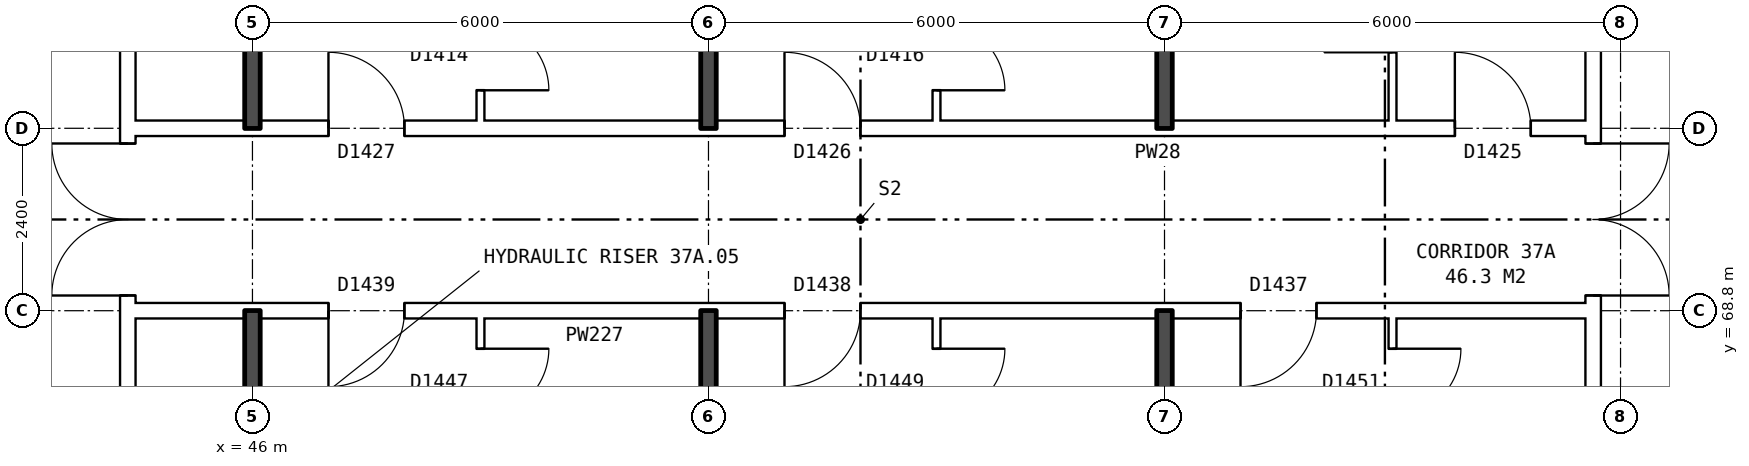
"""IFC4 building model, lengths in metres.
Left out: names, types, materials, properties, quantities, classifications, styles, units other than length and angle.
Written with IfcOpenShell. Run it as: python <this file> out.ifc"""

import sys

from ifc_helpers import new_model, si_unit, direction, frame, frame_2d, origin, place, context, subcontext, project, spatial, rectangle, extrude, element, fill, save


model = new_model("IFC4")
c1 = context("Model", 3, precision=1e-05, world=origin(), true_north=direction((0.0, 1.0)))
c2 = subcontext(c1, "Body", "Model", "MODEL_VIEW")
j1 = project(units=[si_unit("LENGTHUNIT", "METRE"), si_unit("PLANEANGLEUNIT", "RADIAN")], contexts=[c1])
p1 = place(None, origin())
s1 = spatial("IfcSite", under=j1, at=p1, CompositionType="ELEMENT")
p2 = place(p1, origin())
s2 = spatial("IfcBuilding", under=s1, at=p2, CompositionType="ELEMENT")
p3 = place(p2, frame((0.0, 0.0, 133.0)))
s3 = spatial("IfcBuildingStorey", under=s2, at=p3, CompositionType="ELEMENT", Elevation=133.0)
p4 = place(p3, frame((63.64, 63.9, 0.0), z_axis=(0.0, 0.0, 1.0), x_axis=(0.0, 1.0, 0.0)))
e1 = element("IfcWall", 1, at=p4, inside=s3, PredefinedType="PARTITIONING", context=c2, shape_type="SweptSolid", body=[
    extrude(rectangle(XDim=12.2, YDim=0.2, at=frame_2d((6.1, 0.0))), origin(), (0.0, 0.0, 1.0), 2.85),
])
p5 = place(p4, frame((5.1, 0.0, 0.0)))
e2 = element("IfcOpeningElement", 2, at=p5, cuts=e1, PredefinedType="OPENING", context=c2, shape_type="SweptSolid", body=[
    extrude(rectangle(XDim=2.0, YDim=2.1, at=frame_2d((1.0, 1.05))), frame((0.0, 0.11, 0.0), z_axis=(0.0, -1.0, 0.0), x_axis=(1.0, 0.0, 0.0)), (0.0, 0.0, 1.0), 0.22),
])
p6 = place(p3, frame((44.36, 63.9, 0.0), z_axis=(0.0, 0.0, 1.0), x_axis=(0.0, 1.0, 0.0)))
e3 = element("IfcWall", 3, at=p6, inside=s3, PredefinedType="PARTITIONING", context=c2, shape_type="SweptSolid", body=[
    extrude(rectangle(XDim=12.2, YDim=0.2, at=frame_2d((6.1, 0.0))), origin(), (0.0, 0.0, 1.0), 2.85),
])
p7 = place(p6, frame((5.1, 0.0, 0.0)))
e4 = element("IfcOpeningElement", 4, at=p7, cuts=e3, PredefinedType="OPENING", context=c2, shape_type="SweptSolid", body=[
    extrude(rectangle(XDim=2.0, YDim=2.1, at=frame_2d((1.0, 1.05))), frame((0.0, 0.11, 0.0), z_axis=(0.0, -1.0, 0.0), x_axis=(1.0, 0.0, 0.0)), (0.0, 0.0, 1.0), 0.22),
])
p8 = place(p3, frame((44.36, 68.8, 0.0), z_axis=(0.0, 0.0, 1.0), x_axis=(1.0, 0.0, 0.0)))
e5 = element("IfcWall", 5, at=p8, inside=s3, PredefinedType="PARTITIONING", context=c2, shape_type="SweptSolid", body=[
    extrude(rectangle(XDim=19.28, YDim=0.2, at=frame_2d((9.64, 0.0))), origin(), (0.0, 0.0, 1.0), 2.85),
])
p9 = place(p8, frame((14.64, 0.0, 0.0)))
e6 = element("IfcOpeningElement", 6, at=p9, cuts=e5, PredefinedType="OPENING", context=c2, shape_type="SweptSolid", body=[
    extrude(rectangle(XDim=1.0, YDim=2.1, at=frame_2d((0.5, 1.05))), frame((0.0, 0.11, 0.0), z_axis=(0.0, -1.0, 0.0), x_axis=(1.0, 0.0, 0.0)), (0.0, 0.0, 1.0), 0.22),
])
p10 = place(p8, frame((8.64, 0.0, 0.0)))
e7 = element("IfcOpeningElement", 7, at=p10, cuts=e5, PredefinedType="OPENING", context=c2, shape_type="SweptSolid", body=[
    extrude(rectangle(XDim=1.0, YDim=2.1, at=frame_2d((0.5, 1.05))), frame((0.0, 0.11, 0.0), z_axis=(0.0, -1.0, 0.0), x_axis=(1.0, 0.0, 0.0)), (0.0, 0.0, 1.0), 0.22),
])
p11 = place(p8, frame((2.64, 0.0, 0.0)))
e8 = element("IfcOpeningElement", 8, at=p11, cuts=e5, PredefinedType="OPENING", context=c2, shape_type="SweptSolid", body=[
    extrude(rectangle(XDim=1.0, YDim=2.1, at=frame_2d((0.5, 1.05))), frame((0.0, 0.11, 0.0), z_axis=(0.0, -1.0, 0.0), x_axis=(1.0, 0.0, 0.0)), (0.0, 0.0, 1.0), 0.22),
])
p12 = place(p3, frame((44.36, 71.2, 0.0), z_axis=(0.0, 0.0, 1.0), x_axis=(1.0, 0.0, 0.0)))
e9 = element("IfcWall", 9, at=p12, inside=s3, PredefinedType="PARTITIONING", context=c2, shape_type="SweptSolid", body=[
    extrude(rectangle(XDim=19.28, YDim=0.2, at=frame_2d((9.64, 0.0))), origin(), (0.0, 0.0, 1.0), 2.85),
])
p13 = place(p12, frame((17.46, 0.0, 0.0)))
e10 = element("IfcOpeningElement", 10, at=p13, cuts=e9, PredefinedType="OPENING", context=c2, shape_type="SweptSolid", body=[
    extrude(rectangle(XDim=1.0, YDim=2.1, at=frame_2d((0.5, 1.05))), frame((0.0, 0.11, 0.0), z_axis=(0.0, -1.0, 0.0), x_axis=(1.0, 0.0, 0.0)), (0.0, 0.0, 1.0), 0.22),
])
p14 = place(p12, frame((8.64, 0.0, 0.0)))
e11 = element("IfcOpeningElement", 11, at=p14, cuts=e9, PredefinedType="OPENING", context=c2, shape_type="SweptSolid", body=[
    extrude(rectangle(XDim=1.0, YDim=2.1, at=frame_2d((0.5, 1.05))), frame((0.0, 0.11, 0.0), z_axis=(0.0, -1.0, 0.0), x_axis=(1.0, 0.0, 0.0)), (0.0, 0.0, 1.0), 0.22),
])
p15 = place(p12, frame((2.64, 0.0, 0.0)))
e12 = element("IfcOpeningElement", 12, at=p15, cuts=e9, PredefinedType="OPENING", context=c2, shape_type="SweptSolid", body=[
    extrude(rectangle(XDim=1.0, YDim=2.1, at=frame_2d((0.5, 1.05))), frame((0.0, 0.11, 0.0), z_axis=(0.0, -1.0, 0.0), x_axis=(1.0, 0.0, 0.0)), (0.0, 0.0, 1.0), 0.22),
])
for number, where, z_axis, x_axis in (
    (13, (46.0, 63.8, 0.0), (0.0, 0.0, 1.0), (0.0, 1.0, 0.0)),
    (14, (46.0, 71.2, 0.0), (0.0, 0.0, 1.0), (0.0, 1.0, 0.0)),
):
    element("IfcWall", number, at=place(p3, frame(where, z_axis=z_axis, x_axis=x_axis)), inside=s3, PredefinedType="SOLIDWALL", context=c2, shape_type="SweptSolid", body=[
        extrude(rectangle(XDim=5.0, YDim=0.2, at=frame_2d((2.5, 0.0))), origin(), (0.0, 0.0, 1.0), 2.85),
    ])
p16 = place(p3, frame((49.0, 54.36, 0.0), z_axis=(0.0, 0.0, 1.0), x_axis=(0.0, 1.0, 0.0)))
e15 = element("IfcWall", 15, at=p16, inside=s3, PredefinedType="PARTITIONING", context=c2, shape_type="SweptSolid", body=[
    extrude(rectangle(XDim=14.34, YDim=0.1, at=frame_2d((7.17, 0.0))), origin(), (0.0, 0.0, 1.0), 2.85),
])
p17 = place(p16, frame((6.7, 0.0, 0.0)))
e16 = element("IfcOpeningElement", 16, at=p17, cuts=e15, PredefinedType="OPENING", context=c2, shape_type="SweptSolid", body=[
    extrude(rectangle(XDim=0.9, YDim=2.1, at=frame_2d((0.45, 1.05))), frame((0.0, 0.06, 0.0), z_axis=(0.0, -1.0, 0.0), x_axis=(1.0, 0.0, 0.0)), (0.0, 0.0, 1.0), 0.12),
])
p18 = place(p16, frame((13.04, 0.0, 0.0)))
e17 = element("IfcOpeningElement", 17, at=p18, cuts=e15, PredefinedType="OPENING", context=c2, shape_type="SweptSolid", body=[
    extrude(rectangle(XDim=0.9, YDim=2.1, at=frame_2d((0.45, 1.05))), frame((0.0, 0.06, 0.0), z_axis=(0.0, -1.0, 0.0), x_axis=(1.0, 0.0, 0.0)), (0.0, 0.0, 1.0), 0.12),
])
p19 = place(p3, frame((49.0, 71.3, 0.0), z_axis=(0.0, 0.0, 1.0), x_axis=(0.0, 1.0, 0.0)))
e18 = element("IfcWall", 18, at=p19, inside=s3, PredefinedType="PARTITIONING", context=c2, shape_type="SweptSolid", body=[
    extrude(rectangle(XDim=14.34, YDim=0.1, at=frame_2d((7.17, 0.0))), origin(), (0.0, 0.0, 1.0), 2.85),
])
p20 = place(p19, frame((7.94, 0.0, 0.0)))
e19 = element("IfcOpeningElement", 19, at=p20, cuts=e18, PredefinedType="OPENING", context=c2, shape_type="SweptSolid", body=[
    extrude(rectangle(XDim=0.9, YDim=2.1, at=frame_2d((0.45, 1.05))), frame((0.0, 0.06, 0.0), z_axis=(0.0, -1.0, 0.0), x_axis=(1.0, 0.0, 0.0)), (0.0, 0.0, 1.0), 0.12),
])
p21 = place(p19, frame((0.4, 0.0, 0.0)))
e20 = element("IfcOpeningElement", 20, at=p21, cuts=e18, PredefinedType="OPENING", context=c2, shape_type="SweptSolid", body=[
    extrude(rectangle(XDim=0.9, YDim=2.1, at=frame_2d((0.45, 1.05))), frame((0.0, 0.06, 0.0), z_axis=(0.0, -1.0, 0.0), x_axis=(1.0, 0.0, 0.0)), (0.0, 0.0, 1.0), 0.12),
])
for number, where, z_axis, x_axis in (
    (21, (52.0, 54.36, 0.0), (0.0, 0.0, 1.0), (0.0, 1.0, 0.0)),
    (22, (52.0, 71.2, 0.0), (0.0, 0.0, 1.0), (0.0, 1.0, 0.0)),
):
    element("IfcWall", number, at=place(p3, frame(where, z_axis=z_axis, x_axis=x_axis)), inside=s3, PredefinedType="SOLIDWALL", context=c2, shape_type="SweptSolid", body=[
        extrude(rectangle(XDim=14.44, YDim=0.2, at=frame_2d((7.22, 0.0))), origin(), (0.0, 0.0, 1.0), 2.85),
    ])
p22 = place(p3, frame((55.0, 54.36, 0.0), z_axis=(0.0, 0.0, 1.0), x_axis=(0.0, 1.0, 0.0)))
e23 = element("IfcWall", 23, at=p22, inside=s3, PredefinedType="PARTITIONING", context=c2, shape_type="SweptSolid", body=[
    extrude(rectangle(XDim=14.34, YDim=0.1, at=frame_2d((7.17, 0.0))), origin(), (0.0, 0.0, 1.0), 2.85),
])
p23 = place(p22, frame((6.7, 0.0, 0.0)))
e24 = element("IfcOpeningElement", 24, at=p23, cuts=e23, PredefinedType="OPENING", context=c2, shape_type="SweptSolid", body=[
    extrude(rectangle(XDim=0.9, YDim=2.1, at=frame_2d((0.45, 1.05))), frame((0.0, 0.06, 0.0), z_axis=(0.0, -1.0, 0.0), x_axis=(1.0, 0.0, 0.0)), (0.0, 0.0, 1.0), 0.12),
])
p24 = place(p22, frame((13.04, 0.0, 0.0)))
e25 = element("IfcOpeningElement", 25, at=p24, cuts=e23, PredefinedType="OPENING", context=c2, shape_type="SweptSolid", body=[
    extrude(rectangle(XDim=0.9, YDim=2.1, at=frame_2d((0.45, 1.05))), frame((0.0, 0.06, 0.0), z_axis=(0.0, -1.0, 0.0), x_axis=(1.0, 0.0, 0.0)), (0.0, 0.0, 1.0), 0.12),
])
p25 = place(p3, frame((55.0, 71.3, 0.0), z_axis=(0.0, 0.0, 1.0), x_axis=(0.0, 1.0, 0.0)))
e26 = element("IfcWall", 26, at=p25, inside=s3, PredefinedType="PARTITIONING", context=c2, shape_type="SweptSolid", body=[
    extrude(rectangle(XDim=14.34, YDim=0.1, at=frame_2d((7.17, 0.0))), origin(), (0.0, 0.0, 1.0), 2.85),
])
p26 = place(p25, frame((6.74, 0.0, 0.0)))
e27 = element("IfcOpeningElement", 27, at=p26, cuts=e26, PredefinedType="OPENING", context=c2, shape_type="SweptSolid", body=[
    extrude(rectangle(XDim=0.9, YDim=2.1, at=frame_2d((0.45, 1.05))), frame((0.0, 0.06, 0.0), z_axis=(0.0, -1.0, 0.0), x_axis=(1.0, 0.0, 0.0)), (0.0, 0.0, 1.0), 0.12),
])
p27 = place(p25, frame((0.4, 0.0, 0.0)))
e28 = element("IfcOpeningElement", 28, at=p27, cuts=e26, PredefinedType="OPENING", context=c2, shape_type="SweptSolid", body=[
    extrude(rectangle(XDim=0.9, YDim=2.1, at=frame_2d((0.45, 1.05))), frame((0.0, 0.06, 0.0), z_axis=(0.0, -1.0, 0.0), x_axis=(1.0, 0.0, 0.0)), (0.0, 0.0, 1.0), 0.12),
])
for number, where, z_axis, x_axis in (
    (29, (58.0, 54.36, 0.0), (0.0, 0.0, 1.0), (0.0, 1.0, 0.0)),
    (30, (58.0, 71.2, 0.0), (0.0, 0.0, 1.0), (0.0, 1.0, 0.0)),
):
    element("IfcWall", number, at=place(p3, frame(where, z_axis=z_axis, x_axis=x_axis)), inside=s3, PredefinedType="SOLIDWALL", context=c2, shape_type="SweptSolid", body=[
        extrude(rectangle(XDim=14.44, YDim=0.2, at=frame_2d((7.22, 0.0))), origin(), (0.0, 0.0, 1.0), 2.85),
    ])
p28 = place(p3, frame((61.0, 54.36, 0.0), z_axis=(0.0, 0.0, 1.0), x_axis=(0.0, 1.0, 0.0)))
e31 = element("IfcWall", 31, at=p28, inside=s3, PredefinedType="PARTITIONING", context=c2, shape_type="SweptSolid", body=[
    extrude(rectangle(XDim=14.34, YDim=0.1, at=frame_2d((7.17, 0.0))), origin(), (0.0, 0.0, 1.0), 2.85),
])
p29 = place(p28, frame((4.2, 0.0, 0.0)))
e32 = element("IfcOpeningElement", 32, at=p29, cuts=e31, PredefinedType="OPENING", context=c2, shape_type="SweptSolid", body=[
    extrude(rectangle(XDim=0.9, YDim=2.1, at=frame_2d((0.45, 1.05))), frame((0.0, 0.06, 0.0), z_axis=(0.0, -1.0, 0.0), x_axis=(1.0, 0.0, 0.0)), (0.0, 0.0, 1.0), 0.12),
])
p30 = place(p28, frame((13.04, 0.0, 0.0)))
e33 = element("IfcOpeningElement", 33, at=p30, cuts=e31, PredefinedType="OPENING", context=c2, shape_type="SweptSolid", body=[
    extrude(rectangle(XDim=0.9, YDim=2.1, at=frame_2d((0.45, 1.05))), frame((0.0, 0.06, 0.0), z_axis=(0.0, -1.0, 0.0), x_axis=(1.0, 0.0, 0.0)), (0.0, 0.0, 1.0), 0.12),
])
p31 = place(p3, frame((61.0, 71.3, 0.0), z_axis=(0.0, 0.0, 1.0), x_axis=(0.0, 1.0, 0.0)))
e34 = element("IfcWall", 34, at=p31, inside=s3, PredefinedType="PARTITIONING", context=c2, shape_type="SweptSolid", body=[
    extrude(rectangle(XDim=14.34, YDim=0.1, at=frame_2d((7.17, 0.0))), origin(), (0.0, 0.0, 1.0), 2.85),
])
p32 = place(p31, frame((7.94, 0.0, 0.0)))
e35 = element("IfcOpeningElement", 35, at=p32, cuts=e34, PredefinedType="OPENING", context=c2, shape_type="SweptSolid", body=[
    extrude(rectangle(XDim=0.9, YDim=2.1, at=frame_2d((0.45, 1.05))), frame((0.0, 0.06, 0.0), z_axis=(0.0, -1.0, 0.0), x_axis=(1.0, 0.0, 0.0)), (0.0, 0.0, 1.0), 0.12),
])
p33 = place(p31, frame((0.9, 0.0, 0.0)))
e36 = element("IfcOpeningElement", 36, at=p33, cuts=e34, PredefinedType="OPENING", context=c2, shape_type="SweptSolid", body=[
    extrude(rectangle(XDim=0.9, YDim=2.1, at=frame_2d((0.45, 1.05))), frame((0.0, 0.06, 0.0), z_axis=(0.0, -1.0, 0.0), x_axis=(1.0, 0.0, 0.0)), (0.0, 0.0, 1.0), 0.12),
])
p34 = place(p5, frame((2.0, 0.0, 0.0), z_axis=(0.0, 0.0, 1.0), x_axis=(-1.0, 0.0, 0.0)))
e37 = element("IfcDoor", 37, at=p34, inside=s3, OperationType="DOUBLE_DOOR_SINGLE_SWING", PredefinedType="DOOR", context=c2, shape_type="SweptSolid", body=[
    extrude(rectangle(XDim=2.0, YDim=2.1, at=frame_2d((1.0, 1.05))), frame((0.0, 0.025, 0.0), z_axis=(0.0, -1.0, 0.0), x_axis=(1.0, 0.0, 0.0)), (0.0, 0.0, 1.0), 0.05),
])
fill(e2, e37)
p35 = place(p7, origin())
e38 = element("IfcDoor", 38, at=p35, inside=s3, OperationType="DOUBLE_DOOR_SINGLE_SWING", PredefinedType="DOOR", context=c2, shape_type="SweptSolid", body=[
    extrude(rectangle(XDim=2.0, YDim=2.1, at=frame_2d((1.0, 1.05))), frame((0.0, 0.025, 0.0), z_axis=(0.0, -1.0, 0.0), x_axis=(1.0, 0.0, 0.0)), (0.0, 0.0, 1.0), 0.05),
])
fill(e4, e38)
p36 = place(p9, frame((1.0, 0.0, 0.0), z_axis=(0.0, 0.0, 1.0), x_axis=(-1.0, 0.0, 0.0)))
e39 = element("IfcDoor", 39, at=p36, inside=s3, OperationType="SINGLE_SWING_RIGHT", PredefinedType="DOOR", context=c2, shape_type="SweptSolid", body=[
    extrude(rectangle(XDim=1.0, YDim=2.1, at=frame_2d((0.5, 1.05))), frame((0.0, 0.025, 0.0), z_axis=(0.0, -1.0, 0.0), x_axis=(1.0, 0.0, 0.0)), (0.0, 0.0, 1.0), 0.05),
])
fill(e6, e39)
p37 = place(p30, frame((0.9, 0.0, 0.0), z_axis=(0.0, 0.0, 1.0), x_axis=(-1.0, 0.0, 0.0)))
e40 = element("IfcDoor", 40, at=p37, inside=s3, OperationType="SINGLE_SWING_LEFT", PredefinedType="DOOR", context=c2, shape_type="SweptSolid", body=[
    extrude(rectangle(XDim=0.9, YDim=2.1, at=frame_2d((0.45, 1.05))), frame((0.0, 0.025, 0.0), z_axis=(0.0, -1.0, 0.0), x_axis=(1.0, 0.0, 0.0)), (0.0, 0.0, 1.0), 0.05),
])
fill(e33, e40)
p38 = place(p10, frame((1.0, 0.0, 0.0), z_axis=(0.0, 0.0, 1.0), x_axis=(-1.0, 0.0, 0.0)))
e41 = element("IfcDoor", 41, at=p38, inside=s3, OperationType="SINGLE_SWING_RIGHT", PredefinedType="DOOR", context=c2, shape_type="SweptSolid", body=[
    extrude(rectangle(XDim=1.0, YDim=2.1, at=frame_2d((0.5, 1.05))), frame((0.0, 0.025, 0.0), z_axis=(0.0, -1.0, 0.0), x_axis=(1.0, 0.0, 0.0)), (0.0, 0.0, 1.0), 0.05),
])
fill(e7, e41)
p39 = place(p24, frame((0.9, 0.0, 0.0), z_axis=(0.0, 0.0, 1.0), x_axis=(-1.0, 0.0, 0.0)))
e42 = element("IfcDoor", 42, at=p39, inside=s3, OperationType="SINGLE_SWING_LEFT", PredefinedType="DOOR", context=c2, shape_type="SweptSolid", body=[
    extrude(rectangle(XDim=0.9, YDim=2.1, at=frame_2d((0.45, 1.05))), frame((0.0, 0.025, 0.0), z_axis=(0.0, -1.0, 0.0), x_axis=(1.0, 0.0, 0.0)), (0.0, 0.0, 1.0), 0.05),
])
fill(e25, e42)
p40 = place(p11, frame((1.0, 0.0, 0.0), z_axis=(0.0, 0.0, 1.0), x_axis=(-1.0, 0.0, 0.0)))
e43 = element("IfcDoor", 43, at=p40, inside=s3, OperationType="SINGLE_SWING_RIGHT", PredefinedType="DOOR", context=c2, shape_type="SweptSolid", body=[
    extrude(rectangle(XDim=1.0, YDim=2.1, at=frame_2d((0.5, 1.05))), frame((0.0, 0.025, 0.0), z_axis=(0.0, -1.0, 0.0), x_axis=(1.0, 0.0, 0.0)), (0.0, 0.0, 1.0), 0.05),
])
fill(e8, e43)
p41 = place(p18, frame((0.9, 0.0, 0.0), z_axis=(0.0, 0.0, 1.0), x_axis=(-1.0, 0.0, 0.0)))
e44 = element("IfcDoor", 44, at=p41, inside=s3, OperationType="SINGLE_SWING_LEFT", PredefinedType="DOOR", context=c2, shape_type="SweptSolid", body=[
    extrude(rectangle(XDim=0.9, YDim=2.1, at=frame_2d((0.45, 1.05))), frame((0.0, 0.025, 0.0), z_axis=(0.0, -1.0, 0.0), x_axis=(1.0, 0.0, 0.0)), (0.0, 0.0, 1.0), 0.05),
])
fill(e17, e44)
p42 = place(p13, origin())
e45 = element("IfcDoor", 45, at=p42, inside=s3, OperationType="SINGLE_SWING_LEFT", PredefinedType="DOOR", context=c2, shape_type="SweptSolid", body=[
    extrude(rectangle(XDim=1.0, YDim=2.1, at=frame_2d((0.5, 1.05))), frame((0.0, 0.025, 0.0), z_axis=(0.0, -1.0, 0.0), x_axis=(1.0, 0.0, 0.0)), (0.0, 0.0, 1.0), 0.05),
])
fill(e10, e45)
p43 = place(p14, origin())
e46 = element("IfcDoor", 46, at=p43, inside=s3, OperationType="SINGLE_SWING_LEFT", PredefinedType="DOOR", context=c2, shape_type="SweptSolid", body=[
    extrude(rectangle(XDim=1.0, YDim=2.1, at=frame_2d((0.5, 1.05))), frame((0.0, 0.025, 0.0), z_axis=(0.0, -1.0, 0.0), x_axis=(1.0, 0.0, 0.0)), (0.0, 0.0, 1.0), 0.05),
])
fill(e11, e46)
p44 = place(p27, frame((0.9, 0.0, 0.0), z_axis=(0.0, 0.0, 1.0), x_axis=(-1.0, 0.0, 0.0)))
e47 = element("IfcDoor", 47, at=p44, inside=s3, OperationType="SINGLE_SWING_RIGHT", PredefinedType="DOOR", context=c2, shape_type="SweptSolid", body=[
    extrude(rectangle(XDim=0.9, YDim=2.1, at=frame_2d((0.45, 1.05))), frame((0.0, 0.025, 0.0), z_axis=(0.0, -1.0, 0.0), x_axis=(1.0, 0.0, 0.0)), (0.0, 0.0, 1.0), 0.05),
])
fill(e28, e47)
p45 = place(p15, origin())
e48 = element("IfcDoor", 48, at=p45, inside=s3, OperationType="SINGLE_SWING_LEFT", PredefinedType="DOOR", context=c2, shape_type="SweptSolid", body=[
    extrude(rectangle(XDim=1.0, YDim=2.1, at=frame_2d((0.5, 1.05))), frame((0.0, 0.025, 0.0), z_axis=(0.0, -1.0, 0.0), x_axis=(1.0, 0.0, 0.0)), (0.0, 0.0, 1.0), 0.05),
])
fill(e12, e48)
p46 = place(p21, frame((0.9, 0.0, 0.0), z_axis=(0.0, 0.0, 1.0), x_axis=(-1.0, 0.0, 0.0)))
e49 = element("IfcDoor", 49, at=p46, inside=s3, OperationType="SINGLE_SWING_RIGHT", PredefinedType="DOOR", context=c2, shape_type="SweptSolid", body=[
    extrude(rectangle(XDim=0.9, YDim=2.1, at=frame_2d((0.45, 1.05))), frame((0.0, 0.025, 0.0), z_axis=(0.0, -1.0, 0.0), x_axis=(1.0, 0.0, 0.0)), (0.0, 0.0, 1.0), 0.05),
])
fill(e20, e49)
save(model, sys.argv[1])
